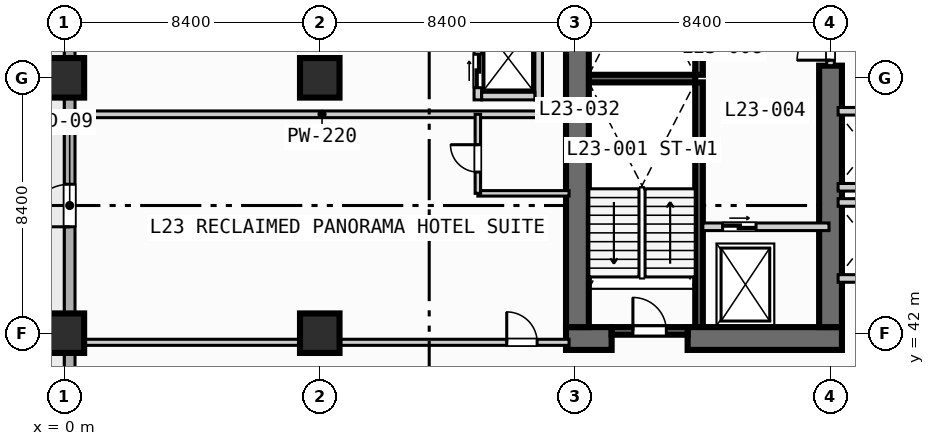
"""IFC4 building model, lengths in metres.
Left out: names, types, materials, properties, quantities, classifications, styles, units other than length and angle.
Written with IfcOpenShell. Run it as: python <this file> out.ifc"""

import sys

from ifc_helpers import new_model, si_unit, direction, frame, frame_2d, origin, origin_2d, place, context, subcontext, project, spatial, rectangle, extrude, element, fill, save


model = new_model("IFC4")
c1 = context("Model", 3, precision=1e-05, world=origin(), true_north=direction((0.0, 1.0)))
c2 = subcontext(c1, "Body", "Model", "MODEL_VIEW")
j1 = project(units=[si_unit("LENGTHUNIT", "METRE"), si_unit("PLANEANGLEUNIT", "RADIAN")], contexts=[c1])
p1 = place(None, origin())
s1 = spatial("IfcSite", under=j1, at=p1, CompositionType="ELEMENT")
p2 = place(p1, origin())
s2 = spatial("IfcBuilding", under=s1, at=p2, CompositionType="ELEMENT")
p3 = place(p2, frame((0.0, 0.0, 100.0)))
s3 = spatial("IfcBuildingStorey", under=s2, at=p3, CompositionType="ELEMENT", Elevation=100.0)
for number, where, z_axis, x_axis in (
    (1, (20.875, 42.2, 0.0), (0.0, 0.0, 1.0), (0.0, 1.0, 0.0)),
    (2, (20.875, 50.5, 0.0), (0.0, 0.0, 1.0), (0.0, 1.0, 0.0)),
):
    element("IfcWall", number, at=place(p3, frame(where, z_axis=z_axis, x_axis=x_axis)), inside=s3, PredefinedType="SOLIDWALL", context=c2, shape_type="SweptSolid", body=[
        extrude(rectangle(XDim=8.05, YDim=0.25, at=frame_2d((4.025, 0.0))), origin(), (0.0, 0.0, 1.0), 3.55),
    ])
p4 = place(p3, frame((17.25, 50.375, 0.0), z_axis=(0.0, 0.0, 1.0), x_axis=(1.0, 0.0, 0.0)))
e3 = element("IfcWall", 3, at=p4, inside=s3, PredefinedType="SOLIDWALL", context=c2, shape_type="SweptSolid", body=[
    extrude(rectangle(XDim=3.5, YDim=0.25, at=frame_2d((1.75, 0.0))), origin(), (0.0, 0.0, 1.0), 3.55),
])
p5 = place(p3, frame((16.5, 41.825, 0.0), z_axis=(0.0, 0.0, 1.0), x_axis=(1.0, 0.0, 0.0)))
e4 = element("IfcWall", 4, at=p5, inside=s3, PredefinedType="SHEAR", context=c2, shape_type="SweptSolid", body=[
    extrude(rectangle(XDim=1.5, YDim=0.75, at=frame_2d((0.75, 0.0))), origin(), (0.0, 0.0, 1.0), 3.55),
])
p6 = place(p3, frame((20.5, 41.825, 0.0), z_axis=(0.0, 0.0, 1.0), x_axis=(1.0, 0.0, 0.0)))
e5 = element("IfcWall", 5, at=p6, inside=s3, PredefinedType="SHEAR", context=c2, shape_type="SweptSolid", body=[
    extrude(rectangle(XDim=5.075, YDim=0.75, at=frame_2d((2.538, 0.0))), origin(), (0.0, 0.0, 1.0), 3.55),
])
p7 = place(p3, frame((16.875, 42.2, 0.0), z_axis=(0.0, 0.0, 1.0), x_axis=(0.0, 1.0, 0.0)))
e6 = element("IfcWall", 6, at=p7, inside=s3, PredefinedType="SHEAR", context=c2, shape_type="SweptSolid", body=[
    extrude(rectangle(XDim=16.35, YDim=0.75, at=frame_2d((8.175, 0.0))), origin(), (0.0, 0.0, 1.0), 3.55),
])
p8 = place(p3, frame((25.2, 42.2, 0.0), z_axis=(0.0, 0.0, 1.0), x_axis=(0.0, 1.0, 0.0)))
e7 = element("IfcWall", 7, at=p8, inside=s3, PredefinedType="SHEAR", context=c2, shape_type="SweptSolid", body=[
    extrude(rectangle(XDim=8.6, YDim=0.75, at=frame_2d((4.3, 0.0))), origin(), (0.0, 0.0, 1.0), 3.55),
])
for number, where, z_axis, x_axis in (
    (8, (0.0, 42.0, 0.0), (0.0, 0.0, 1.0), (1.0, 0.0, 0.0)),
    (9, (0.0, 50.4, 0.0), (0.0, 0.0, 1.0), (1.0, 0.0, 0.0)),
    (10, (8.4, 42.0, 0.0), (0.0, 0.0, 1.0), (1.0, 0.0, 0.0)),
    (11, (8.4, 50.4, 0.0), (0.0, 0.0, 1.0), (1.0, 0.0, 0.0)),
):
    element("IfcColumn", number, at=place(p3, frame(where, z_axis=z_axis, x_axis=x_axis)), inside=s3, PredefinedType="COLUMN", context=c2, shape_type="SweptSolid", body=[
        extrude(rectangle(XDim=1.3, YDim=1.3, at=origin_2d()), origin(), (0.0, 0.0, 1.0), 3.8),
    ])
p9 = place(p3, frame((0.175, 3.175, 0.0), z_axis=(0.0, 0.0, 1.0), x_axis=(0.0, 1.0, 0.0)))
e12 = element("IfcWall", 12, at=p9, inside=s3, PredefinedType="STANDARD", context=c2, shape_type="SweptSolid", body=[
    extrude(rectangle(XDim=86.05, YDim=0.35, at=frame_2d((43.025, 0.0))), origin(), (0.0, 0.0, 1.0), 3.55),
])
p10 = place(p9, frame((42.325, 0.0, 0.0)))
e13 = element("IfcOpeningElement", 13, at=p10, cuts=e12, PredefinedType="OPENING", context=c2, shape_type="SweptSolid", body=[
    extrude(rectangle(XDim=1.4, YDim=2.2, at=frame_2d((0.7, 1.1))), frame((0.0, 0.185, 0.0), z_axis=(0.0, -1.0, 0.0), x_axis=(1.0, 0.0, 0.0)), (0.0, 0.0, 1.0), 0.37),
])
p11 = place(p9, frame((25.125, 0.0, 0.85)))
e14 = element("IfcOpeningElement", 14, at=p11, cuts=e12, PredefinedType="OPENING", context=c2, shape_type="SweptSolid", body=[
    extrude(rectangle(XDim=2.2, YDim=1.8, at=frame_2d((1.1, 0.9))), frame((0.0, 0.185, 0.0), z_axis=(0.0, -1.0, 0.0), x_axis=(1.0, 0.0, 0.0)), (0.0, 0.0, 1.0), 0.37),
])
p12 = place(p9, frame((33.525, 0.0, 0.85)))
e15 = element("IfcOpeningElement", 15, at=p12, cuts=e12, PredefinedType="OPENING", context=c2, shape_type="SweptSolid", body=[
    extrude(rectangle(XDim=2.2, YDim=1.8, at=frame_2d((1.1, 0.9))), frame((0.0, 0.185, 0.0), z_axis=(0.0, -1.0, 0.0), x_axis=(1.0, 0.0, 0.0)), (0.0, 0.0, 1.0), 0.37),
])
p13 = place(p9, frame((58.725, 0.0, 0.85)))
e16 = element("IfcOpeningElement", 16, at=p13, cuts=e12, PredefinedType="OPENING", context=c2, shape_type="SweptSolid", body=[
    extrude(rectangle(XDim=2.2, YDim=1.8, at=frame_2d((1.1, 0.9))), frame((0.0, 0.185, 0.0), z_axis=(0.0, -1.0, 0.0), x_axis=(1.0, 0.0, 0.0)), (0.0, 0.0, 1.0), 0.37),
])
p14 = place(p9, frame((65.125, 0.0, 0.85)))
e17 = element("IfcOpeningElement", 17, at=p14, cuts=e12, PredefinedType="OPENING", context=c2, shape_type="SweptSolid", body=[
    extrude(rectangle(XDim=1.8, YDim=1.8, at=frame_2d((0.9, 0.9))), frame((0.0, 0.185, 0.0), z_axis=(0.0, -1.0, 0.0), x_axis=(1.0, 0.0, 0.0)), (0.0, 0.0, 1.0), 0.37),
])
p15 = place(p9, frame((73.275, 0.0, 0.85)))
e18 = element("IfcOpeningElement", 18, at=p15, cuts=e12, PredefinedType="OPENING", context=c2, shape_type="SweptSolid", body=[
    extrude(rectangle(XDim=1.8, YDim=1.8, at=frame_2d((0.9, 0.9))), frame((0.0, 0.185, 0.0), z_axis=(0.0, -1.0, 0.0), x_axis=(1.0, 0.0, 0.0)), (0.0, 0.0, 1.0), 0.37),
])
p16 = place(p9, frame((81.625, 0.0, 0.85)))
e19 = element("IfcOpeningElement", 19, at=p16, cuts=e12, PredefinedType="OPENING", context=c2, shape_type="SweptSolid", body=[
    extrude(rectangle(XDim=1.8, YDim=1.8, at=frame_2d((0.9, 0.9))), frame((0.0, 0.185, 0.0), z_axis=(0.0, -1.0, 0.0), x_axis=(1.0, 0.0, 0.0)), (0.0, 0.0, 1.0), 0.37),
])
p17 = place(p3, frame((18.0, 42.075, 0.0), z_axis=(0.0, 0.0, 1.0), x_axis=(1.0, 0.0, 0.0)))
e20 = element("IfcWall", 20, at=p17, inside=s3, PredefinedType="SOLIDWALL", context=c2, shape_type="SweptSolid", body=[
    extrude(rectangle(XDim=2.5, YDim=0.25, at=frame_2d((1.25, 0.0))), origin(), (0.0, 0.0, 1.0), 3.55),
])
p18 = place(p17, frame((0.7, 0.0, 0.0)))
e21 = element("IfcOpeningElement", 21, at=p18, cuts=e20, PredefinedType="OPENING", context=c2, shape_type="SweptSolid", body=[
    extrude(rectangle(XDim=1.1, YDim=2.15, at=frame_2d((0.55, 1.075))), frame((0.0, 0.135, 0.0), z_axis=(0.0, -1.0, 0.0), x_axis=(1.0, 0.0, 0.0)), (0.0, 0.0, 1.0), 0.27),
])
p19 = place(p3, frame((21.0, 45.5, 0.0), z_axis=(0.0, 0.0, 1.0), x_axis=(1.0, 0.0, 0.0)))
e22 = element("IfcWall", 22, at=p19, inside=s3, PredefinedType="SOLIDWALL", context=c2, shape_type="SweptSolid", body=[
    extrude(rectangle(XDim=4.15, YDim=0.25, at=frame_2d((2.075, 0.0))), origin(), (0.0, 0.0, 1.0), 3.55),
])
p20 = place(p19, frame((0.65, 0.0, 0.0)))
e23 = element("IfcOpeningElement", 23, at=p20, cuts=e22, PredefinedType="OPENING", context=c2, shape_type="SweptSolid", body=[
    extrude(rectangle(XDim=1.1, YDim=2.15, at=frame_2d((0.55, 1.075))), frame((0.0, 0.135, 0.0), z_axis=(0.0, -1.0, 0.0), x_axis=(1.0, 0.0, 0.0)), (0.0, 0.0, 1.0), 0.27),
])
p21 = place(p3, frame((25.2, 50.8, 0.0), z_axis=(0.0, 0.0, 1.0), x_axis=(0.0, 1.0, 0.0)))
e24 = element("IfcWall", 24, at=p21, inside=s3, PredefinedType="SOLIDWALL", context=c2, shape_type="SweptSolid", body=[
    extrude(rectangle(XDim=1.48, YDim=0.25, at=frame_2d((0.74, 0.0))), origin(), (0.0, 0.0, 1.0), 3.55),
])
p22 = place(p21, frame((0.18, 0.0, 0.0)))
e25 = element("IfcOpeningElement", 25, at=p22, cuts=e24, PredefinedType="OPENING", context=c2, shape_type="SweptSolid", body=[
    extrude(rectangle(XDim=1.1, YDim=2.15, at=frame_2d((0.55, 1.075))), frame((0.0, 0.135, 0.0), z_axis=(0.0, -1.0, 0.0), x_axis=(1.0, 0.0, 0.0)), (0.0, 0.0, 1.0), 0.27),
])
p23 = place(p3, frame((13.6, 49.675, 0.0), z_axis=(0.0, 0.0, 1.0), x_axis=(0.0, 1.0, 0.0)))
e26 = element("IfcWall", 26, at=p23, inside=s3, PredefinedType="SOLIDWALL", context=c2, shape_type="SweptSolid", body=[
    extrude(rectangle(XDim=2.75, YDim=0.25, at=frame_2d((1.375, 0.0))), origin(), (0.0, 0.0, 1.0), 3.55),
])
p24 = place(p23, frame((0.4, 0.0, 0.0)))
e27 = element("IfcOpeningElement", 27, at=p24, cuts=e26, PredefinedType="OPENING", context=c2, shape_type="SweptSolid", body=[
    extrude(rectangle(XDim=1.1, YDim=2.15, at=frame_2d((0.55, 1.075))), frame((0.0, 0.135, 0.0), z_axis=(0.0, -1.0, 0.0), x_axis=(1.0, 0.0, 0.0)), (0.0, 0.0, 1.0), 0.27),
])
p25 = place(p3, frame((15.6, 49.675, 0.0), z_axis=(0.0, 0.0, 1.0), x_axis=(0.0, 1.0, 0.0)))
e28 = element("IfcWall", 28, at=p25, inside=s3, PredefinedType="SOLIDWALL", context=c2, shape_type="SweptSolid", body=[
    extrude(rectangle(XDim=2.75, YDim=0.25, at=frame_2d((1.375, 0.0))), origin(), (0.0, 0.0, 1.0), 3.55),
])
p26 = place(p3, frame((13.725, 49.8, 0.0), z_axis=(0.0, 0.0, 1.0), x_axis=(1.0, 0.0, 0.0)))
e29 = element("IfcWall", 29, at=p26, inside=s3, PredefinedType="SOLIDWALL", context=c2, shape_type="SweptSolid", body=[
    extrude(rectangle(XDim=1.75, YDim=0.25, at=frame_2d((0.875, 0.0))), origin(), (0.0, 0.0, 1.0), 3.55),
])
for number, where, z_axis, x_axis in (
    (30, (25.45, 43.8, 0.0), (0.0, 0.0, 1.0), (1.0, 0.0, 0.0)),
    (31, (25.45, 46.3, 0.0), (0.0, 0.0, 1.0), (1.0, 0.0, 0.0)),
    (32, (25.45, 46.8, 0.0), (0.0, 0.0, 1.0), (1.0, 0.0, 0.0)),
    (33, (25.45, 49.3, 0.0), (0.0, 0.0, 1.0), (1.0, 0.0, 0.0)),
):
    element("IfcWall", number, at=place(p3, frame(where, z_axis=z_axis, x_axis=x_axis)), inside=s3, PredefinedType="SOLIDWALL", context=c2, shape_type="SweptSolid", body=[
        extrude(rectangle(XDim=1.825, YDim=0.25, at=frame_2d((0.913, 0.0))), origin(), (0.0, 0.0, 1.0), 3.55),
    ])
p27 = place(p3, frame((0.35, 41.7, 0.0), z_axis=(0.0, 0.0, 1.0), x_axis=(1.0, 0.0, 0.0)))
e34 = element("IfcWall", 34, at=p27, inside=s3, PredefinedType="PARTITIONING", context=c2, shape_type="SweptSolid", body=[
    extrude(rectangle(XDim=16.25, YDim=0.2, at=frame_2d((8.125, 0.0))), origin(), (0.0, 0.0, 1.0), 2.8),
])
p28 = place(p27, frame((14.2, 0.0, 0.0)))
e35 = element("IfcOpeningElement", 35, at=p28, cuts=e34, PredefinedType="OPENING", context=c2, shape_type="SweptSolid", body=[
    extrude(rectangle(XDim=1.0, YDim=2.15, at=frame_2d((0.5, 1.075))), frame((0.0, 0.11, 0.0), z_axis=(0.0, -1.0, 0.0), x_axis=(1.0, 0.0, 0.0)), (0.0, 0.0, 1.0), 0.22),
])
p29 = place(p3, frame((0.35, 49.2, 0.0), z_axis=(0.0, 0.0, 1.0), x_axis=(1.0, 0.0, 0.0)))
e36 = element("IfcWall", 36, at=p29, inside=s3, PredefinedType="PARTITIONING", context=c2, shape_type="SweptSolid", body=[
    extrude(rectangle(XDim=16.25, YDim=0.22, at=frame_2d((8.125, 0.0))), origin(), (0.0, 0.0, 1.0), 3.55),
])
p30 = place(p3, frame((13.6, 46.6, 0.0), z_axis=(0.0, 0.0, 1.0), x_axis=(1.0, 0.0, 0.0)))
e37 = element("IfcWall", 37, at=p30, inside=s3, PredefinedType="PLUMBINGWALL", context=c2, shape_type="SweptSolid", body=[
    extrude(rectangle(XDim=3.0, YDim=0.18, at=frame_2d((1.5, 0.0))), origin(), (0.0, 0.0, 1.0), 3.55),
])
p31 = place(p3, frame((13.6, 46.6, 0.0), z_axis=(0.0, 0.0, 1.0), x_axis=(0.0, 1.0, 0.0)))
e38 = element("IfcWall", 38, at=p31, inside=s3, PredefinedType="PLUMBINGWALL", context=c2, shape_type="SweptSolid", body=[
    extrude(rectangle(XDim=2.6, YDim=0.18, at=frame_2d((1.3, 0.0))), origin(), (0.0, 0.0, 1.0), 3.55),
])
p32 = place(p31, frame((0.7, 0.0, 0.0)))
e39 = element("IfcOpeningElement", 39, at=p32, cuts=e38, PredefinedType="OPENING", context=c2, shape_type="SweptSolid", body=[
    extrude(rectangle(XDim=0.9, YDim=2.1, at=frame_2d((0.45, 1.05))), frame((0.0, 0.1, 0.0), z_axis=(0.0, -1.0, 0.0), x_axis=(1.0, 0.0, 0.0)), (0.0, 0.0, 1.0), 0.2),
])
p33 = place(p10, origin())
e40 = element("IfcDoor", 40, at=p33, inside=s3, OperationType="SINGLE_SWING_LEFT", PredefinedType="DOOR", context=c2, shape_type="SweptSolid", body=[
    extrude(rectangle(XDim=1.4, YDim=2.2, at=frame_2d((0.7, 1.1))), frame((0.0, 0.025, 0.0), z_axis=(0.0, -1.0, 0.0), x_axis=(1.0, 0.0, 0.0)), (0.0, 0.0, 1.0), 0.05),
])
fill(e13, e40)
p34 = place(p18, origin())
e41 = element("IfcDoor", 41, at=p34, inside=s3, OperationType="SINGLE_SWING_LEFT", PredefinedType="DOOR", context=c2, shape_type="SweptSolid", body=[
    extrude(rectangle(XDim=1.1, YDim=2.15, at=frame_2d((0.55, 1.075))), frame((0.0, 0.025, 0.0), z_axis=(0.0, -1.0, 0.0), x_axis=(1.0, 0.0, 0.0)), (0.0, 0.0, 1.0), 0.05),
])
fill(e21, e41)
p35 = place(p20, origin())
e42 = element("IfcDoor", 42, at=p35, inside=s3, OperationType="SLIDING_TO_LEFT", PredefinedType="DOOR", context=c2, shape_type="SweptSolid", body=[
    extrude(rectangle(XDim=1.1, YDim=2.15, at=frame_2d((0.55, 1.075))), frame((0.0, 0.025, 0.0), z_axis=(0.0, -1.0, 0.0), x_axis=(1.0, 0.0, 0.0)), (0.0, 0.0, 1.0), 0.05),
])
fill(e23, e42)
p36 = place(p22, origin())
e43 = element("IfcDoor", 43, at=p36, inside=s3, OperationType="SINGLE_SWING_LEFT", PredefinedType="DOOR", context=c2, shape_type="SweptSolid", body=[
    extrude(rectangle(XDim=1.1, YDim=2.15, at=frame_2d((0.55, 1.075))), frame((0.0, 0.025, 0.0), z_axis=(0.0, -1.0, 0.0), x_axis=(1.0, 0.0, 0.0)), (0.0, 0.0, 1.0), 0.05),
])
fill(e25, e43)
p37 = place(p24, origin())
e44 = element("IfcDoor", 44, at=p37, inside=s3, OperationType="SLIDING_TO_LEFT", PredefinedType="DOOR", context=c2, shape_type="SweptSolid", body=[
    extrude(rectangle(XDim=1.1, YDim=2.15, at=frame_2d((0.55, 1.075))), frame((0.0, 0.025, 0.0), z_axis=(0.0, -1.0, 0.0), x_axis=(1.0, 0.0, 0.0)), (0.0, 0.0, 1.0), 0.05),
])
fill(e27, e44)
p38 = place(p28, origin())
e45 = element("IfcDoor", 45, at=p38, inside=s3, OperationType="SINGLE_SWING_LEFT", PredefinedType="DOOR", context=c2, shape_type="SweptSolid", body=[
    extrude(rectangle(XDim=1.0, YDim=2.15, at=frame_2d((0.5, 1.075))), frame((0.0, 0.025, 0.0), z_axis=(0.0, -1.0, 0.0), x_axis=(1.0, 0.0, 0.0)), (0.0, 0.0, 1.0), 0.05),
])
fill(e35, e45)
p39 = place(p32, origin())
e46 = element("IfcDoor", 46, at=p39, inside=s3, OperationType="SINGLE_SWING_RIGHT", PredefinedType="DOOR", context=c2, shape_type="SweptSolid", body=[
    extrude(rectangle(XDim=0.9, YDim=2.1, at=frame_2d((0.45, 1.05))), frame((0.0, 0.025, 0.0), z_axis=(0.0, -1.0, 0.0), x_axis=(1.0, 0.0, 0.0)), (0.0, 0.0, 1.0), 0.05),
])
fill(e39, e46)
save(model, sys.argv[1])
